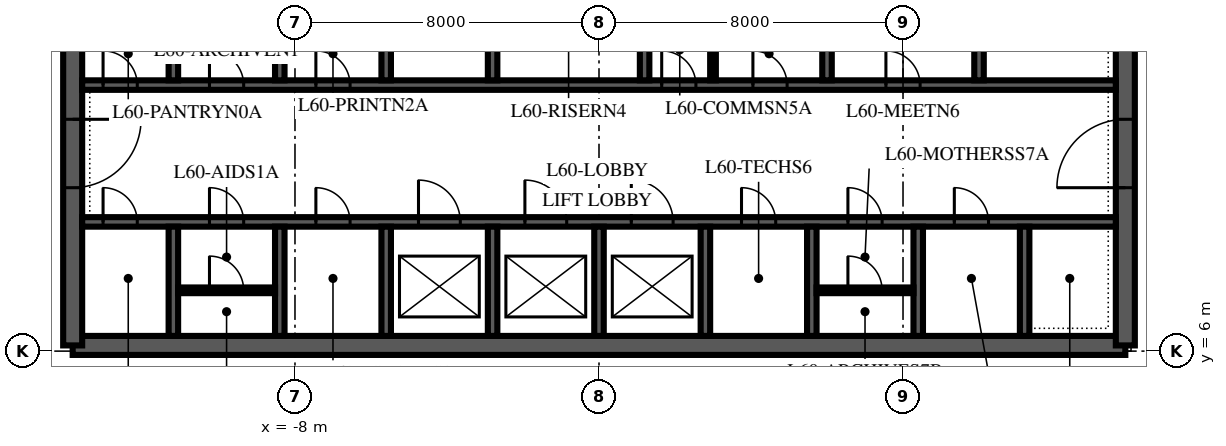
"""IFC4 building model, lengths in metres.
Left out: names, types, materials, properties, quantities, classifications, styles, units other than length and angle.
Written with IfcOpenShell. Run it as: python <this file> out.ifc"""

import sys

from ifc_helpers import new_model, si_unit, direction, frame, frame_2d, origin, place, context, subcontext, project, spatial, polyline, rectangle, outline, extrude, element, fill, save


model = new_model("IFC4")
c1 = context("Model", 3, precision=1e-05, world=origin(), true_north=direction((0.0, 1.0)))
c2 = subcontext(c1, "Body", "Model", "MODEL_VIEW")
j1 = project(units=[si_unit("LENGTHUNIT", "METRE"), si_unit("PLANEANGLEUNIT", "RADIAN")], contexts=[c1])
p1 = place(None, origin())
s1 = spatial("IfcSite", under=j1, at=p1, CompositionType="ELEMENT")
p2 = place(p1, origin())
s2 = spatial("IfcBuilding", under=s1, at=p2, CompositionType="ELEMENT")
p3 = place(p2, frame((0.0, 0.0, 260.0)))
s3 = spatial("IfcBuildingStorey", under=s2, at=p3, CompositionType="ELEMENT", Elevation=260.0)
p4 = place(p3, frame((-13.85, 6.15, 0.0), z_axis=(0.0, 0.0, 1.0), x_axis=(1.0, 0.0, 0.0)))
e1 = element("IfcWall", 1, at=p4, inside=s3, PredefinedType="SHEAR", context=c2, shape_type="SweptSolid", body=[
    extrude(rectangle(XDim=27.7, YDim=0.5, at=frame_2d((13.85, 0.0))), origin(), (0.0, 0.0, 1.0), 4.0),
])
p5 = place(p3, frame((13.85, 6.15, 0.0), z_axis=(0.0, 0.0, 1.0), x_axis=(0.0, 1.0, 0.0)))
e2 = element("IfcWall", 2, at=p5, inside=s3, PredefinedType="SHEAR", context=c2, shape_type="SweptSolid", body=[
    extrude(outline(polyline([(0.0, -0.25), (17.7, -0.25), (17.7, 0.0), (17.45, 0.0), (17.45, 0.25), (0.25, 0.25), (0.25, 0.0), (0.0, 0.0), (0.0, -0.25)])), origin(), (0.0, 0.0, 1.0), 4.0),
])
p6 = place(p5, frame((4.15, 0.0, 0.0)))
e3 = element("IfcOpeningElement", 3, at=p6, cuts=e2, PredefinedType="OPENING", context=c2, shape_type="SweptSolid", body=[
    extrude(rectangle(XDim=1.8, YDim=2.4, at=frame_2d((0.9, 1.2))), frame((0.0, 0.265, 0.0), z_axis=(0.0, -1.0, 0.0), x_axis=(1.0, 0.0, 0.0)), (0.0, 0.0, 1.0), 0.53),
])
p7 = place(p3, frame((-13.85, 23.85, 0.0), z_axis=(0.0, 0.0, 1.0), x_axis=(0.0, -1.0, 0.0)))
e4 = element("IfcWall", 4, at=p7, inside=s3, PredefinedType="SHEAR", context=c2, shape_type="SweptSolid", body=[
    extrude(outline(polyline([(0.0, -0.25), (17.7, -0.25), (17.7, 0.0), (17.45, 0.0), (17.45, 0.25), (0.25, 0.25), (0.25, 0.0), (0.0, 0.0), (0.0, -0.25)])), origin(), (0.0, 0.0, 1.0), 4.0),
])
p8 = place(p7, frame((11.75, 0.0, 0.0)))
e5 = element("IfcOpeningElement", 5, at=p8, cuts=e4, PredefinedType="OPENING", context=c2, shape_type="SweptSolid", body=[
    extrude(rectangle(XDim=1.8, YDim=2.4, at=frame_2d((0.9, 1.2))), frame((0.0, 0.265, 0.0), z_axis=(0.0, -1.0, 0.0), x_axis=(1.0, 0.0, 0.0)), (0.0, 0.0, 1.0), 0.53),
])
p9 = place(p3, frame((-13.6, 9.4, 0.0), z_axis=(0.0, 0.0, 1.0), x_axis=(1.0, 0.0, 0.0)))
e6 = element("IfcWall", 6, at=p9, inside=s3, PredefinedType="SHEAR", context=c2, shape_type="SweptSolid", body=[
    extrude(rectangle(XDim=27.2, YDim=0.25, at=frame_2d((13.6, 0.0))), origin(), (0.0, 0.0, 1.0), 4.0),
])
p10 = place(p9, frame((8.85, 0.0, 0.0)))
e7 = element("IfcOpeningElement", 7, at=p10, cuts=e6, PredefinedType="OPENING", context=c2, shape_type="SweptSolid", body=[
    extrude(rectangle(XDim=1.1, YDim=2.1, at=frame_2d((0.55, 1.05))), frame((0.0, 0.14, 0.0), z_axis=(0.0, -1.0, 0.0), x_axis=(1.0, 0.0, 0.0)), (0.0, 0.0, 1.0), 0.28),
])
p11 = place(p9, frame((11.65, 0.0, 0.0)))
e8 = element("IfcOpeningElement", 8, at=p11, cuts=e6, PredefinedType="OPENING", context=c2, shape_type="SweptSolid", body=[
    extrude(rectangle(XDim=1.1, YDim=2.1, at=frame_2d((0.55, 1.05))), frame((0.0, 0.14, 0.0), z_axis=(0.0, -1.0, 0.0), x_axis=(1.0, 0.0, 0.0)), (0.0, 0.0, 1.0), 0.28),
])
p12 = place(p9, frame((14.45, 0.0, 0.0)))
e9 = element("IfcOpeningElement", 9, at=p12, cuts=e6, PredefinedType="OPENING", context=c2, shape_type="SweptSolid", body=[
    extrude(rectangle(XDim=1.1, YDim=2.1, at=frame_2d((0.55, 1.05))), frame((0.0, 0.14, 0.0), z_axis=(0.0, -1.0, 0.0), x_axis=(1.0, 0.0, 0.0)), (0.0, 0.0, 1.0), 0.28),
])
p13 = place(p9, frame((0.55, 0.0, 0.0)))
e10 = element("IfcOpeningElement", 10, at=p13, cuts=e6, PredefinedType="OPENING", context=c2, shape_type="SweptSolid", body=[
    extrude(rectangle(XDim=0.9, YDim=2.1, at=frame_2d((0.45, 1.05))), frame((0.0, 0.14, 0.0), z_axis=(0.0, -1.0, 0.0), x_axis=(1.0, 0.0, 0.0)), (0.0, 0.0, 1.0), 0.28),
])
p14 = place(p9, frame((3.35, 0.0, 0.0)))
e11 = element("IfcOpeningElement", 11, at=p14, cuts=e6, PredefinedType="OPENING", context=c2, shape_type="SweptSolid", body=[
    extrude(rectangle(XDim=0.9, YDim=2.1, at=frame_2d((0.45, 1.05))), frame((0.0, 0.14, 0.0), z_axis=(0.0, -1.0, 0.0), x_axis=(1.0, 0.0, 0.0)), (0.0, 0.0, 1.0), 0.28),
])
p15 = place(p9, frame((6.15, 0.0, 0.0)))
e12 = element("IfcOpeningElement", 12, at=p15, cuts=e6, PredefinedType="OPENING", context=c2, shape_type="SweptSolid", body=[
    extrude(rectangle(XDim=0.9, YDim=2.1, at=frame_2d((0.45, 1.05))), frame((0.0, 0.14, 0.0), z_axis=(0.0, -1.0, 0.0), x_axis=(1.0, 0.0, 0.0)), (0.0, 0.0, 1.0), 0.28),
])
p16 = place(p9, frame((17.35, 0.0, 0.0)))
e13 = element("IfcOpeningElement", 13, at=p16, cuts=e6, PredefinedType="OPENING", context=c2, shape_type="SweptSolid", body=[
    extrude(rectangle(XDim=0.9, YDim=2.1, at=frame_2d((0.45, 1.05))), frame((0.0, 0.14, 0.0), z_axis=(0.0, -1.0, 0.0), x_axis=(1.0, 0.0, 0.0)), (0.0, 0.0, 1.0), 0.28),
])
p17 = place(p9, frame((20.15, 0.0, 0.0)))
e14 = element("IfcOpeningElement", 14, at=p17, cuts=e6, PredefinedType="OPENING", context=c2, shape_type="SweptSolid", body=[
    extrude(rectangle(XDim=0.9, YDim=2.1, at=frame_2d((0.45, 1.05))), frame((0.0, 0.14, 0.0), z_axis=(0.0, -1.0, 0.0), x_axis=(1.0, 0.0, 0.0)), (0.0, 0.0, 1.0), 0.28),
])
p18 = place(p9, frame((22.95, 0.0, 0.0)))
e15 = element("IfcOpeningElement", 15, at=p18, cuts=e6, PredefinedType="OPENING", context=c2, shape_type="SweptSolid", body=[
    extrude(rectangle(XDim=0.9, YDim=2.1, at=frame_2d((0.45, 1.05))), frame((0.0, 0.14, 0.0), z_axis=(0.0, -1.0, 0.0), x_axis=(1.0, 0.0, 0.0)), (0.0, 0.0, 1.0), 0.28),
])
p19 = place(p3, frame((-13.6, 13.0, 0.0), z_axis=(0.0, 0.0, 1.0), x_axis=(1.0, 0.0, 0.0)))
e16 = element("IfcWall", 16, at=p19, inside=s3, PredefinedType="SHEAR", context=c2, shape_type="SweptSolid", body=[
    extrude(rectangle(XDim=27.2, YDim=0.25, at=frame_2d((13.6, 0.0))), origin(), (0.0, 0.0, 1.0), 4.0),
])
p20 = place(p19, frame((15.25, 0.0, 0.0)))
e17 = element("IfcOpeningElement", 17, at=p20, cuts=e16, PredefinedType="OPENING", context=c2, shape_type="SweptSolid", body=[
    extrude(rectangle(XDim=0.9, YDim=2.1, at=frame_2d((0.45, 1.05))), frame((0.0, 0.14, 0.0), z_axis=(0.0, -1.0, 0.0), x_axis=(1.0, 0.0, 0.0)), (0.0, 0.0, 1.0), 0.28),
])
p21 = place(p19, frame((17.65, 0.0, 0.0)))
e18 = element("IfcOpeningElement", 18, at=p21, cuts=e16, PredefinedType="OPENING", context=c2, shape_type="SweptSolid", body=[
    extrude(rectangle(XDim=0.9, YDim=2.1, at=frame_2d((0.45, 1.05))), frame((0.0, 0.14, 0.0), z_axis=(0.0, -1.0, 0.0), x_axis=(1.0, 0.0, 0.0)), (0.0, 0.0, 1.0), 0.28),
])
p22 = place(p19, frame((21.15, 0.0, 0.0)))
e19 = element("IfcOpeningElement", 19, at=p22, cuts=e16, PredefinedType="OPENING", context=c2, shape_type="SweptSolid", body=[
    extrude(rectangle(XDim=0.9, YDim=2.1, at=frame_2d((0.45, 1.05))), frame((0.0, 0.14, 0.0), z_axis=(0.0, -1.0, 0.0), x_axis=(1.0, 0.0, 0.0)), (0.0, 0.0, 1.0), 0.28),
])
p23 = place(p19, frame((0.55, 0.0, 0.0)))
e20 = element("IfcOpeningElement", 20, at=p23, cuts=e16, PredefinedType="OPENING", context=c2, shape_type="SweptSolid", body=[
    extrude(rectangle(XDim=0.9, YDim=2.1, at=frame_2d((0.45, 1.05))), frame((0.0, 0.14, 0.0), z_axis=(0.0, -1.0, 0.0), x_axis=(1.0, 0.0, 0.0)), (0.0, 0.0, 1.0), 0.28),
])
p24 = place(p19, frame((3.35, 0.0, 0.0)))
e21 = element("IfcOpeningElement", 21, at=p24, cuts=e16, PredefinedType="OPENING", context=c2, shape_type="SweptSolid", body=[
    extrude(rectangle(XDim=0.9, YDim=2.1, at=frame_2d((0.45, 1.05))), frame((0.0, 0.14, 0.0), z_axis=(0.0, -1.0, 0.0), x_axis=(1.0, 0.0, 0.0)), (0.0, 0.0, 1.0), 0.28),
])
p25 = place(p19, frame((6.15, 0.0, 0.0)))
e22 = element("IfcOpeningElement", 22, at=p25, cuts=e16, PredefinedType="OPENING", context=c2, shape_type="SweptSolid", body=[
    extrude(rectangle(XDim=0.9, YDim=2.1, at=frame_2d((0.45, 1.05))), frame((0.0, 0.14, 0.0), z_axis=(0.0, -1.0, 0.0), x_axis=(1.0, 0.0, 0.0)), (0.0, 0.0, 1.0), 0.28),
])
for number, where, z_axis, x_axis in (
    (23, (-11.2, 6.4, 0.0), (0.0, 0.0, 1.0), (0.0, 1.0, 0.0)),
    (24, (-8.4, 6.4, 0.0), (0.0, 0.0, 1.0), (0.0, 1.0, 0.0)),
    (25, (-5.6, 6.4, 0.0), (0.0, 0.0, 1.0), (0.0, 1.0, 0.0)),
    (26, (-2.8, 6.4, 0.0), (0.0, 0.0, 1.0), (0.0, 1.0, 0.0)),
    (27, (0.0, 6.4, 0.0), (0.0, 0.0, 1.0), (0.0, 1.0, 0.0)),
    (28, (2.8, 6.4, 0.0), (0.0, 0.0, 1.0), (0.0, 1.0, 0.0)),
    (29, (5.6, 6.4, 0.0), (0.0, 0.0, 1.0), (0.0, 1.0, 0.0)),
    (30, (8.4, 6.4, 0.0), (0.0, 0.0, 1.0), (0.0, 1.0, 0.0)),
    (31, (11.2, 6.4, 0.0), (0.0, 0.0, 1.0), (0.0, 1.0, 0.0)),
):
    element("IfcWall", number, at=place(p3, frame(where, z_axis=z_axis, x_axis=x_axis)), inside=s3, PredefinedType="SHEAR", context=c2, shape_type="SweptSolid", body=[
        extrude(rectangle(XDim=2.875, YDim=0.25, at=frame_2d((1.438, 0.0))), origin(), (0.0, 0.0, 1.0), 4.0),
    ])
for number, where, z_axis, x_axis in (
    (32, (-11.2, 13.125, 0.0), (0.0, 0.0, 1.0), (0.0, 1.0, 0.0)),
    (33, (-8.4, 13.125, 0.0), (0.0, 0.0, 1.0), (0.0, 1.0, 0.0)),
    (34, (-5.6, 13.125, 0.0), (0.0, 0.0, 1.0), (0.0, 1.0, 0.0)),
    (35, (-2.8, 13.125, 0.0), (0.0, 0.0, 1.0), (0.0, 1.0, 0.0)),
    (36, (1.2, 13.125, 0.0), (0.0, 0.0, 1.0), (0.0, 1.0, 0.0)),
    (37, (6.0, 13.125, 0.0), (0.0, 0.0, 1.0), (0.0, 1.0, 0.0)),
    (38, (10.0, 13.125, 0.0), (0.0, 0.0, 1.0), (0.0, 1.0, 0.0)),
):
    element("IfcWall", number, at=place(p3, frame(where, z_axis=z_axis, x_axis=x_axis)), inside=s3, PredefinedType="SHEAR", context=c2, shape_type="SweptSolid", body=[
        extrude(rectangle(XDim=2.75, YDim=0.25, at=frame_2d((1.375, 0.0))), origin(), (0.0, 0.0, 1.0), 4.0),
    ])
p26 = place(p3, frame((3.0, 13.125, 0.0), z_axis=(0.0, 0.0, 1.0), x_axis=(0.0, 1.0, 0.0)))
e39 = element("IfcWall", 39, at=p26, inside=s3, PredefinedType="PARTITIONING", context=c2, shape_type="SweptSolid", body=[
    extrude(rectangle(XDim=1.55, YDim=0.15, at=frame_2d((0.775, 0.0))), origin(), (0.0, 0.0, 1.0), 3.85),
])
p27 = place(p3, frame((-11.075, 7.6, 0.0), z_axis=(0.0, 0.0, 1.0), x_axis=(1.0, 0.0, 0.0)))
e40 = element("IfcWall", 40, at=p27, inside=s3, PredefinedType="PARTITIONING", context=c2, shape_type="SweptSolid", body=[
    extrude(rectangle(XDim=2.55, YDim=0.15, at=frame_2d((1.275, 0.0))), origin(), (0.0, 0.0, 1.0), 3.85),
])
p28 = place(p27, frame((0.825, 0.0, 0.0)))
e41 = element("IfcOpeningElement", 41, at=p28, cuts=e40, PredefinedType="OPENING", context=c2, shape_type="SweptSolid", body=[
    extrude(rectangle(XDim=0.9, YDim=2.1, at=frame_2d((0.45, 1.05))), frame((0.0, 0.09, 0.0), z_axis=(0.0, -1.0, 0.0), x_axis=(1.0, 0.0, 0.0)), (0.0, 0.0, 1.0), 0.18),
])
p29 = place(p3, frame((5.725, 7.6, 0.0), z_axis=(0.0, 0.0, 1.0), x_axis=(1.0, 0.0, 0.0)))
e42 = element("IfcWall", 42, at=p29, inside=s3, PredefinedType="PARTITIONING", context=c2, shape_type="SweptSolid", body=[
    extrude(rectangle(XDim=2.55, YDim=0.15, at=frame_2d((1.275, 0.0))), origin(), (0.0, 0.0, 1.0), 3.85),
])
p30 = place(p29, frame((0.825, 0.0, 0.0)))
e43 = element("IfcOpeningElement", 43, at=p30, cuts=e42, PredefinedType="OPENING", context=c2, shape_type="SweptSolid", body=[
    extrude(rectangle(XDim=0.9, YDim=2.1, at=frame_2d((0.45, 1.05))), frame((0.0, 0.09, 0.0), z_axis=(0.0, -1.0, 0.0), x_axis=(1.0, 0.0, 0.0)), (0.0, 0.0, 1.0), 0.18),
])
p31 = place(p6, origin())
e44 = element("IfcDoor", 44, at=p31, inside=s3, OperationType="DOUBLE_DOOR_SINGLE_SWING", PredefinedType="DOOR", context=c2, shape_type="SweptSolid", body=[
    extrude(rectangle(XDim=1.8, YDim=2.4, at=frame_2d((0.9, 1.2))), frame((0.0, 0.25, 0.0), z_axis=(0.0, -1.0, 0.0), x_axis=(1.0, 0.0, 0.0)), (0.0, 0.0, 1.0), 0.5),
])
fill(e3, e44)
p32 = place(p8, origin())
e45 = element("IfcDoor", 45, at=p32, inside=s3, OperationType="DOUBLE_DOOR_SINGLE_SWING", PredefinedType="DOOR", context=c2, shape_type="SweptSolid", body=[
    extrude(rectangle(XDim=1.8, YDim=2.4, at=frame_2d((0.9, 1.2))), frame((0.0, 0.25, 0.0), z_axis=(0.0, -1.0, 0.0), x_axis=(1.0, 0.0, 0.0)), (0.0, 0.0, 1.0), 0.5),
])
fill(e5, e45)
p33 = place(p10, origin())
e46 = element("IfcDoor", 46, at=p33, inside=s3, OperationType="SLIDING_TO_LEFT", PredefinedType="DOOR", context=c2, shape_type="SweptSolid", body=[
    extrude(rectangle(XDim=1.1, YDim=2.1, at=frame_2d((0.55, 1.05))), frame((0.0, 0.125, 0.0), z_axis=(0.0, -1.0, 0.0), x_axis=(1.0, 0.0, 0.0)), (0.0, 0.0, 1.0), 0.25),
])
fill(e7, e46)
p34 = place(p11, origin())
e47 = element("IfcDoor", 47, at=p34, inside=s3, OperationType="SLIDING_TO_LEFT", PredefinedType="DOOR", context=c2, shape_type="SweptSolid", body=[
    extrude(rectangle(XDim=1.1, YDim=2.1, at=frame_2d((0.55, 1.05))), frame((0.0, 0.125, 0.0), z_axis=(0.0, -1.0, 0.0), x_axis=(1.0, 0.0, 0.0)), (0.0, 0.0, 1.0), 0.25),
])
fill(e8, e47)
p35 = place(p12, origin())
e48 = element("IfcDoor", 48, at=p35, inside=s3, OperationType="SLIDING_TO_LEFT", PredefinedType="DOOR", context=c2, shape_type="SweptSolid", body=[
    extrude(rectangle(XDim=1.1, YDim=2.1, at=frame_2d((0.55, 1.05))), frame((0.0, 0.125, 0.0), z_axis=(0.0, -1.0, 0.0), x_axis=(1.0, 0.0, 0.0)), (0.0, 0.0, 1.0), 0.25),
])
fill(e9, e48)
p36 = place(p20, origin())
e49 = element("IfcDoor", 49, at=p36, inside=s3, OperationType="SINGLE_SWING_LEFT", PredefinedType="DOOR", context=c2, shape_type="SweptSolid", body=[
    extrude(rectangle(XDim=0.9, YDim=2.1, at=frame_2d((0.45, 1.05))), frame((0.0, 0.125, 0.0), z_axis=(0.0, -1.0, 0.0), x_axis=(1.0, 0.0, 0.0)), (0.0, 0.0, 1.0), 0.25),
])
fill(e17, e49)
p37 = place(p21, origin())
e50 = element("IfcDoor", 50, at=p37, inside=s3, OperationType="SINGLE_SWING_LEFT", PredefinedType="DOOR", context=c2, shape_type="SweptSolid", body=[
    extrude(rectangle(XDim=0.9, YDim=2.1, at=frame_2d((0.45, 1.05))), frame((0.0, 0.125, 0.0), z_axis=(0.0, -1.0, 0.0), x_axis=(1.0, 0.0, 0.0)), (0.0, 0.0, 1.0), 0.25),
])
fill(e18, e50)
p38 = place(p22, origin())
e51 = element("IfcDoor", 51, at=p38, inside=s3, OperationType="SINGLE_SWING_LEFT", PredefinedType="DOOR", context=c2, shape_type="SweptSolid", body=[
    extrude(rectangle(XDim=0.9, YDim=2.1, at=frame_2d((0.45, 1.05))), frame((0.0, 0.125, 0.0), z_axis=(0.0, -1.0, 0.0), x_axis=(1.0, 0.0, 0.0)), (0.0, 0.0, 1.0), 0.25),
])
fill(e19, e51)
p39 = place(p23, origin())
e52 = element("IfcDoor", 52, at=p39, inside=s3, OperationType="SINGLE_SWING_LEFT", PredefinedType="DOOR", context=c2, shape_type="SweptSolid", body=[
    extrude(rectangle(XDim=0.9, YDim=2.1, at=frame_2d((0.45, 1.05))), frame((0.0, 0.125, 0.0), z_axis=(0.0, -1.0, 0.0), x_axis=(1.0, 0.0, 0.0)), (0.0, 0.0, 1.0), 0.25),
])
fill(e20, e52)
p40 = place(p24, origin())
e53 = element("IfcDoor", 53, at=p40, inside=s3, OperationType="SINGLE_SWING_LEFT", PredefinedType="DOOR", context=c2, shape_type="SweptSolid", body=[
    extrude(rectangle(XDim=0.9, YDim=2.1, at=frame_2d((0.45, 1.05))), frame((0.0, 0.125, 0.0), z_axis=(0.0, -1.0, 0.0), x_axis=(1.0, 0.0, 0.0)), (0.0, 0.0, 1.0), 0.25),
])
fill(e21, e53)
p41 = place(p25, origin())
e54 = element("IfcDoor", 54, at=p41, inside=s3, OperationType="SINGLE_SWING_LEFT", PredefinedType="DOOR", context=c2, shape_type="SweptSolid", body=[
    extrude(rectangle(XDim=0.9, YDim=2.1, at=frame_2d((0.45, 1.05))), frame((0.0, 0.125, 0.0), z_axis=(0.0, -1.0, 0.0), x_axis=(1.0, 0.0, 0.0)), (0.0, 0.0, 1.0), 0.25),
])
fill(e22, e54)
p42 = place(p13, origin())
e55 = element("IfcDoor", 55, at=p42, inside=s3, OperationType="SINGLE_SWING_LEFT", PredefinedType="DOOR", context=c2, shape_type="SweptSolid", body=[
    extrude(rectangle(XDim=0.9, YDim=2.1, at=frame_2d((0.45, 1.05))), frame((0.0, 0.125, 0.0), z_axis=(0.0, -1.0, 0.0), x_axis=(1.0, 0.0, 0.0)), (0.0, 0.0, 1.0), 0.25),
])
fill(e10, e55)
p43 = place(p14, origin())
e56 = element("IfcDoor", 56, at=p43, inside=s3, OperationType="SINGLE_SWING_LEFT", PredefinedType="DOOR", context=c2, shape_type="SweptSolid", body=[
    extrude(rectangle(XDim=0.9, YDim=2.1, at=frame_2d((0.45, 1.05))), frame((0.0, 0.125, 0.0), z_axis=(0.0, -1.0, 0.0), x_axis=(1.0, 0.0, 0.0)), (0.0, 0.0, 1.0), 0.25),
])
fill(e11, e56)
p44 = place(p28, origin())
e57 = element("IfcDoor", 57, at=p44, inside=s3, OperationType="SINGLE_SWING_LEFT", PredefinedType="DOOR", context=c2, shape_type="SweptSolid", body=[
    extrude(rectangle(XDim=0.9, YDim=2.1, at=frame_2d((0.45, 1.05))), frame((0.0, 0.075, 0.0), z_axis=(0.0, -1.0, 0.0), x_axis=(1.0, 0.0, 0.0)), (0.0, 0.0, 1.0), 0.149),
])
fill(e41, e57)
p45 = place(p15, origin())
e58 = element("IfcDoor", 58, at=p45, inside=s3, OperationType="SINGLE_SWING_LEFT", PredefinedType="DOOR", context=c2, shape_type="SweptSolid", body=[
    extrude(rectangle(XDim=0.9, YDim=2.1, at=frame_2d((0.45, 1.05))), frame((0.0, 0.125, 0.0), z_axis=(0.0, -1.0, 0.0), x_axis=(1.0, 0.0, 0.0)), (0.0, 0.0, 1.0), 0.25),
])
fill(e12, e58)
p46 = place(p16, origin())
e59 = element("IfcDoor", 59, at=p46, inside=s3, OperationType="SINGLE_SWING_LEFT", PredefinedType="DOOR", context=c2, shape_type="SweptSolid", body=[
    extrude(rectangle(XDim=0.9, YDim=2.1, at=frame_2d((0.45, 1.05))), frame((0.0, 0.125, 0.0), z_axis=(0.0, -1.0, 0.0), x_axis=(1.0, 0.0, 0.0)), (0.0, 0.0, 1.0), 0.25),
])
fill(e13, e59)
p47 = place(p17, origin())
e60 = element("IfcDoor", 60, at=p47, inside=s3, OperationType="SINGLE_SWING_LEFT", PredefinedType="DOOR", context=c2, shape_type="SweptSolid", body=[
    extrude(rectangle(XDim=0.9, YDim=2.1, at=frame_2d((0.45, 1.05))), frame((0.0, 0.125, 0.0), z_axis=(0.0, -1.0, 0.0), x_axis=(1.0, 0.0, 0.0)), (0.0, 0.0, 1.0), 0.25),
])
fill(e14, e60)
p48 = place(p30, origin())
e61 = element("IfcDoor", 61, at=p48, inside=s3, OperationType="SINGLE_SWING_LEFT", PredefinedType="DOOR", context=c2, shape_type="SweptSolid", body=[
    extrude(rectangle(XDim=0.9, YDim=2.1, at=frame_2d((0.45, 1.05))), frame((0.0, 0.075, 0.0), z_axis=(0.0, -1.0, 0.0), x_axis=(1.0, 0.0, 0.0)), (0.0, 0.0, 1.0), 0.149),
])
fill(e43, e61)
p49 = place(p18, origin())
e62 = element("IfcDoor", 62, at=p49, inside=s3, OperationType="SINGLE_SWING_LEFT", PredefinedType="DOOR", context=c2, shape_type="SweptSolid", body=[
    extrude(rectangle(XDim=0.9, YDim=2.1, at=frame_2d((0.45, 1.05))), frame((0.0, 0.125, 0.0), z_axis=(0.0, -1.0, 0.0), x_axis=(1.0, 0.0, 0.0)), (0.0, 0.0, 1.0), 0.25),
])
fill(e15, e62)
save(model, sys.argv[1])
